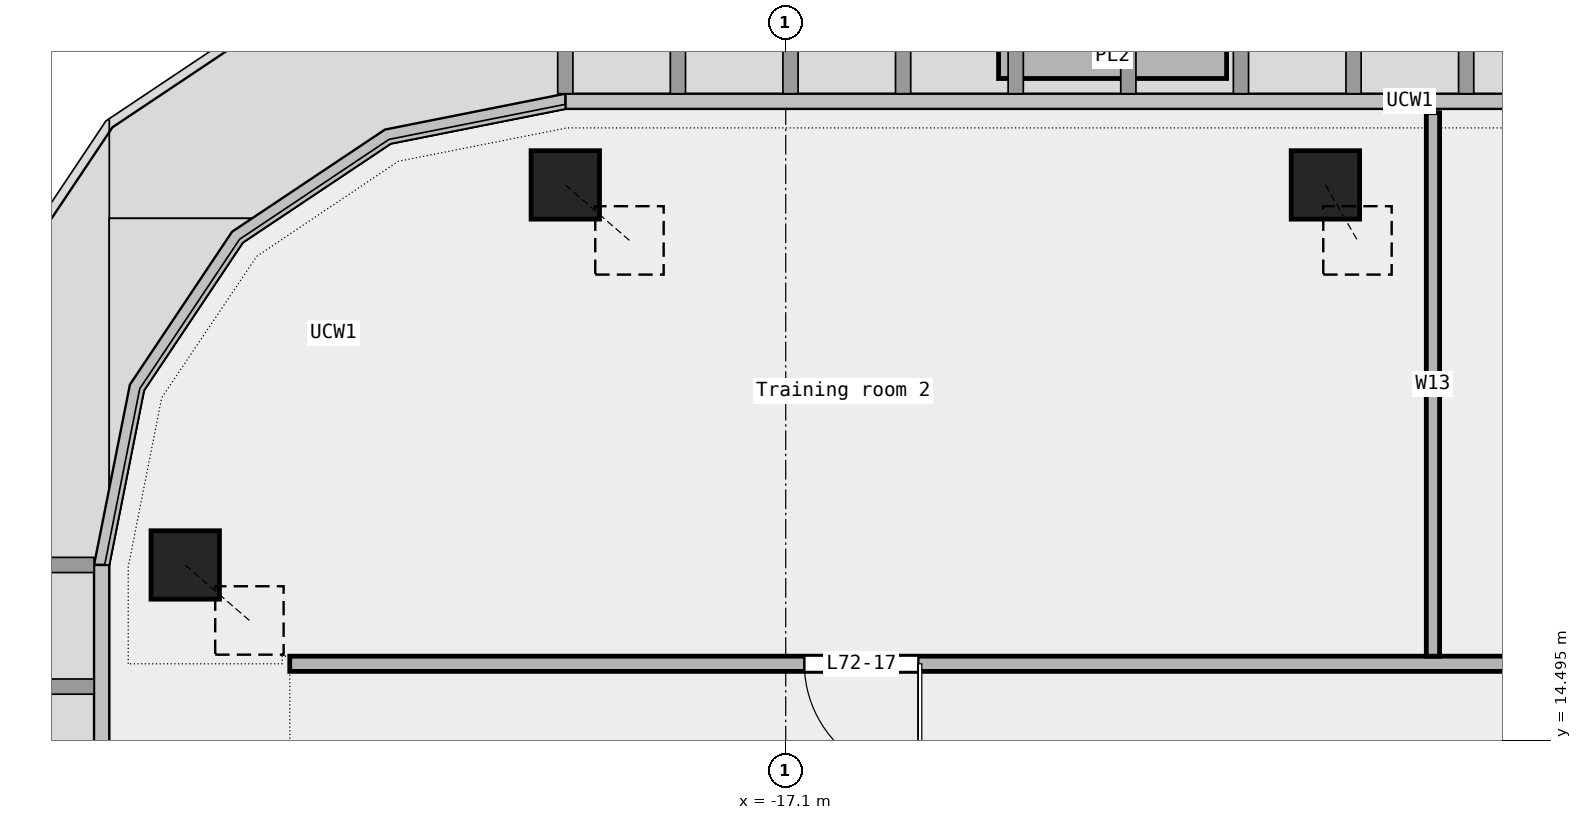
"""IFC4 building model, lengths in metres.
Left out: names, types, materials, properties, quantities, classifications, styles, units other than length and angle.
Written with IfcOpenShell. Run it as: python <this file> out.ifc"""

import sys

from ifc_helpers import new_model, si_unit, direction, frame, frame_2d, origin, origin_2d, place, context, subcontext, project, spatial, rectangle, extrude, element, fill, save


model = new_model("IFC4")
c1 = context("Model", 3, precision=1e-05, world=origin(), true_north=direction((0.0, 1.0)))
c2 = subcontext(c1, "Body", "Model", "MODEL_VIEW")
j1 = project(units=[si_unit("LENGTHUNIT", "METRE"), si_unit("PLANEANGLEUNIT", "RADIAN")], contexts=[c1])
p1 = place(None, origin())
s1 = spatial("IfcSite", under=j1, at=p1, CompositionType="ELEMENT")
p2 = place(p1, origin())
s2 = spatial("IfcBuilding", under=s1, at=p2, CompositionType="ELEMENT")
p3 = place(p2, frame((0.0, 0.0, 329.4)))
s3 = spatial("IfcBuildingStorey", under=s2, at=p3, CompositionType="ELEMENT", Elevation=329.4)
p4 = place(p3, frame((-10.0, 21.8, 0.0), z_axis=(0.112612491067, -0.194856104335, 0.974345690943), x_axis=(0.8658093198, 0.500374081811, 0.0)))
e1 = element("IfcColumn", 1, at=p4, inside=s3, PredefinedType="COLUMN", context=c2, shape_type="SweptSolid", body=[
    extrude(rectangle(XDim=0.9, YDim=0.9, at=origin_2d()), origin(), (0.0, 0.0, 1.0), 3.746),
])
for number, where, z_axis, x_axis in (
    (2, (-20.0, 21.8, 0.0), (0.221, -0.191, 0.956), (0.654, 0.756, 0.0)),
    (3, (-25.0, 16.8, 0.0), (0.221, -0.191, 0.956), (0.654, 0.756, 0.0)),
):
    element("IfcColumn", number, at=place(p3, frame(where, z_axis=z_axis, x_axis=x_axis)), inside=s3, PredefinedType="COLUMN", context=c2, shape_type="SweptSolid", body=[
        extrude(rectangle(XDim=0.9, YDim=0.9, at=origin_2d()), origin(), (0.0, 0.0, 1.0), 3.817),
    ])
p5 = place(p3, frame((-11.3, 23.5, 0.0), z_axis=(0.0, 0.0, 1.0), x_axis=(-1.0, 0.0, 0.0)))
e4 = element("IfcWall", 4, at=p5, inside=s3, PredefinedType="STANDARD", context=c2, shape_type="SweptSolid", body=[
    extrude(rectangle(XDim=3.0, YDim=0.6, at=frame_2d((1.5, 0.0))), origin(), (0.0, 0.0, 1.0), 0.7),
])
p6 = place(p3, frame((-23.625, 15.5, 0.0), z_axis=(0.0, 0.0, 1.0), x_axis=(1.0, 0.0, 0.0)))
e5 = element("IfcWall", 5, at=p6, inside=s3, PredefinedType="PARTITIONING", context=c2, shape_type="SweptSolid", body=[
    extrude(rectangle(XDim=47.25, YDim=0.2, at=frame_2d((23.625, 0.0))), origin(), (0.0, 0.0, 1.0), 3.65),
])
p7 = place(p6, frame((43.905, 0.0, 0.0)))
e6 = element("IfcOpeningElement", 6, at=p7, cuts=e5, PredefinedType="OPENING", context=c2, shape_type="SweptSolid", body=[
    extrude(rectangle(XDim=1.2, YDim=2.1, at=frame_2d((0.6, 1.05))), frame((0.0, 0.112, 0.0), z_axis=(0.0, -1.0, 0.0), x_axis=(1.0, 0.0, 0.0)), (0.0, 0.0, 1.0), 0.224),
])
p8 = place(p6, frame((32.8, 0.0, 0.0)))
e7 = element("IfcOpeningElement", 7, at=p8, cuts=e5, PredefinedType="OPENING", context=c2, shape_type="SweptSolid", body=[
    extrude(rectangle(XDim=1.5, YDim=2.1, at=frame_2d((0.75, 1.05))), frame((0.0, 0.112, 0.0), z_axis=(0.0, -1.0, 0.0), x_axis=(1.0, 0.0, 0.0)), (0.0, 0.0, 1.0), 0.224),
])
p9 = place(p6, frame((19.59, 0.0, 0.0)))
e8 = element("IfcOpeningElement", 8, at=p9, cuts=e5, PredefinedType="OPENING", context=c2, shape_type="SweptSolid", body=[
    extrude(rectangle(XDim=1.2, YDim=2.1, at=frame_2d((0.6, 1.05))), frame((0.0, 0.112, 0.0), z_axis=(0.0, -1.0, 0.0), x_axis=(1.0, 0.0, 0.0)), (0.0, 0.0, 1.0), 0.224),
])
p10 = place(p6, frame((6.77, 0.0, 0.0)))
e9 = element("IfcOpeningElement", 9, at=p10, cuts=e5, PredefinedType="OPENING", context=c2, shape_type="SweptSolid", body=[
    extrude(rectangle(XDim=1.5, YDim=2.1, at=frame_2d((0.75, 1.05))), frame((0.0, 0.112, 0.0), z_axis=(0.0, -1.0, 0.0), x_axis=(1.0, 0.0, 0.0)), (0.0, 0.0, 1.0), 0.224),
])
p11 = place(p3, frame((-8.585, 15.6, 0.0), z_axis=(0.0, 0.0, 1.0), x_axis=(0.0, 1.0, 0.0)))
e10 = element("IfcWall", 10, at=p11, inside=s3, PredefinedType="PARTITIONING", context=c2, shape_type="SweptSolid", body=[
    extrude(rectangle(XDim=7.15, YDim=0.175, at=frame_2d((3.575, 0.0))), origin(), (0.0, 0.0, 1.0), 3.65),
])
p12 = place(p10, origin())
e11 = element("IfcDoor", 11, at=p12, inside=s3, OperationType="DOUBLE_DOOR_SINGLE_SWING", PredefinedType="DOOR", context=c2, shape_type="SweptSolid", body=[
    extrude(rectangle(XDim=1.5, YDim=2.1, at=frame_2d((0.75, 1.05))), frame((0.0, 0.025, 0.0), z_axis=(0.0, -1.0, 0.0), x_axis=(1.0, 0.0, 0.0)), (0.0, 0.0, 1.0), 0.05),
])
fill(e9, e11)
save(model, sys.argv[1])
